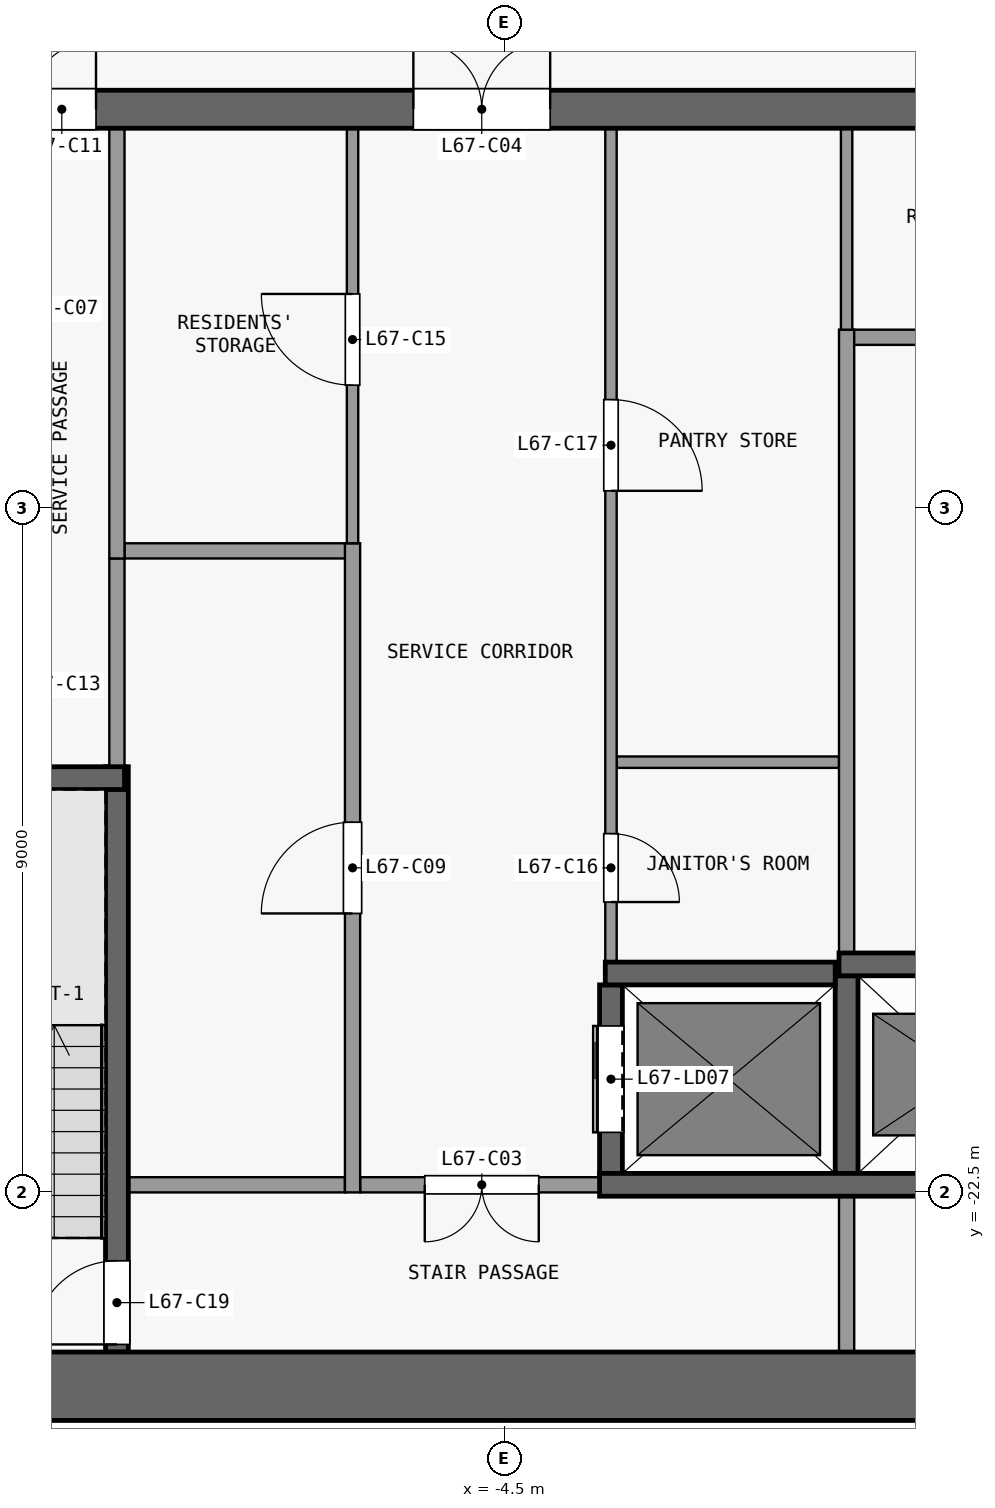
"""IFC4 building model, lengths in metres.
Left out: names, types, materials, properties, quantities, classifications, styles, units other than length and angle.
Written with IfcOpenShell. Run it as: python <this file> out.ifc"""

import sys

from ifc_helpers import new_model, si_unit, direction, frame, frame_2d, origin, place, context, subcontext, project, spatial, rectangle, extrude, element, fill, save


model = new_model("IFC4")
c1 = context("Model", 3, precision=1e-05, world=origin(), true_north=direction((0.0, 1.0)))
c2 = subcontext(c1, "Body", "Model", "MODEL_VIEW")
j1 = project(units=[si_unit("LENGTHUNIT", "METRE"), si_unit("PLANEANGLEUNIT", "RADIAN")], contexts=[c1])
p1 = place(None, origin())
s1 = spatial("IfcSite", under=j1, at=p1, CompositionType="ELEMENT")
p2 = place(p1, origin())
s2 = spatial("IfcBuilding", under=s1, at=p2, CompositionType="ELEMENT")
p3 = place(p2, frame((0.0, 0.0, 266.3)))
s3 = spatial("IfcBuildingStorey", under=s2, at=p3, CompositionType="ELEMENT", Elevation=266.3)
p4 = place(p3, frame((-13.1, -25.05, 0.0), z_axis=(0.0, 0.0, 1.0), x_axis=(1.0, 0.0, 0.0)))
e1 = element("IfcWall", 1, at=p4, inside=s3, PredefinedType="SHEAR", context=c2, shape_type="SweptSolid", body=[
    extrude(rectangle(XDim=26.2, YDim=0.9, at=frame_2d((13.1, 0.0))), origin(), (0.0, 0.0, 1.0), 3.3),
])
p5 = place(p3, frame((-13.1, -8.25, 0.0), z_axis=(0.0, 0.0, 1.0), x_axis=(1.0, 0.0, 0.0)))
e2 = element("IfcWall", 2, at=p5, inside=s3, PredefinedType="SHEAR", context=c2, shape_type="SweptSolid", body=[
    extrude(rectangle(XDim=26.2, YDim=0.5, at=frame_2d((13.1, 0.0))), origin(), (0.0, 0.0, 1.0), 3.3),
])
p6 = place(p5, frame((7.4, 0.0, 0.0)))
e3 = element("IfcOpeningElement", 3, at=p6, cuts=e2, PredefinedType="OPENING", context=c2, shape_type="SweptSolid", body=[
    extrude(rectangle(XDim=1.8, YDim=2.1, at=frame_2d((0.9, 1.05))), frame((0.0, 0.26, 0.0), z_axis=(0.0, -1.0, 0.0), x_axis=(1.0, 0.0, 0.0)), (0.0, 0.0, 1.0), 0.52),
])
p7 = place(p5, frame((17.0, 0.0, 0.0)))
e4 = element("IfcOpeningElement", 4, at=p7, cuts=e2, PredefinedType="OPENING", context=c2, shape_type="SweptSolid", body=[
    extrude(rectangle(XDim=1.8, YDim=2.1, at=frame_2d((0.9, 1.05))), frame((0.0, 0.26, 0.0), z_axis=(0.0, -1.0, 0.0), x_axis=(1.0, 0.0, 0.0)), (0.0, 0.0, 1.0), 0.52),
])
p8 = place(p5, frame((2.325, 0.0, 0.0)))
e5 = element("IfcOpeningElement", 5, at=p8, cuts=e2, PredefinedType="OPENING", context=c2, shape_type="SweptSolid", body=[
    extrude(rectangle(XDim=0.9, YDim=2.1, at=frame_2d((0.45, 1.05))), frame((0.0, 0.26, 0.0), z_axis=(0.0, -1.0, 0.0), x_axis=(1.0, 0.0, 0.0)), (0.0, 0.0, 1.0), 0.52),
])
p9 = place(p5, frame((22.975, 0.0, 0.0)))
e6 = element("IfcOpeningElement", 6, at=p9, cuts=e2, PredefinedType="OPENING", context=c2, shape_type="SweptSolid", body=[
    extrude(rectangle(XDim=0.9, YDim=2.1, at=frame_2d((0.45, 1.05))), frame((0.0, 0.26, 0.0), z_axis=(0.0, -1.0, 0.0), x_axis=(1.0, 0.0, 0.0)), (0.0, 0.0, 1.0), 0.52),
])
p10 = place(p3, frame((-9.45, -22.4, 0.0), z_axis=(0.0, 0.0, 1.0), x_axis=(1.0, 0.0, 0.0)))
e7 = element("IfcWall", 7, at=p10, inside=s3, PredefinedType="PARTITIONING", context=c2, shape_type="SweptSolid", body=[
    extrude(rectangle(XDim=2.85, YDim=0.2, at=frame_2d((1.425, 0.0))), origin(), (0.0, 0.0, 1.0), 3.3),
])
p11 = place(p3, frame((-3.25, -22.4, 0.0), z_axis=(0.0, 0.0, 1.0), x_axis=(-1.0, 0.0, 0.0)))
e8 = element("IfcWall", 8, at=p11, inside=s3, PredefinedType="PARTITIONING", context=c2, shape_type="SweptSolid", body=[
    extrude(rectangle(XDim=3.15, YDim=0.2, at=frame_2d((1.575, 0.0))), origin(), (0.0, 0.0, 1.0), 3.3),
])
p12 = place(p11, frame((0.8, 0.0, 0.0)))
e9 = element("IfcOpeningElement", 9, at=p12, cuts=e8, PredefinedType="OPENING", context=c2, shape_type="SweptSolid", body=[
    extrude(rectangle(XDim=1.5, YDim=2.1, at=frame_2d((0.75, 1.05))), frame((0.0, 0.11, 0.0), z_axis=(0.0, -1.0, 0.0), x_axis=(1.0, 0.0, 0.0)), (0.0, 0.0, 1.0), 0.22),
])
p13 = place(p3, frame((-3.25, -22.4, 0.0), z_axis=(0.0, 0.0, 1.0), x_axis=(1.0, 0.0, 0.0)))
e10 = element("IfcWall", 10, at=p13, inside=s3, PredefinedType="SHEAR", context=c2, shape_type="SweptSolid", body=[
    extrude(rectangle(XDim=6.5, YDim=0.3, at=frame_2d((3.25, 0.0))), origin(), (0.0, 0.0, 1.0), 3.3),
])
p14 = place(p3, frame((-3.175, -19.62, 0.0), z_axis=(0.0, 0.0, 1.0), x_axis=(1.0, 0.0, 0.0)))
e11 = element("IfcWall", 11, at=p14, inside=s3, PredefinedType="SHEAR", context=c2, shape_type="SweptSolid", body=[
    extrude(rectangle(XDim=3.025, YDim=0.3, at=frame_2d((1.513, 0.0))), origin(), (0.0, 0.0, 1.0), 3.3),
])
p15 = place(p3, frame((-0.1, -19.5, 0.0), z_axis=(0.0, 0.0, 1.0), x_axis=(1.0, 0.0, 0.0)))
e12 = element("IfcWall", 12, at=p15, inside=s3, PredefinedType="SHEAR", context=c2, shape_type="SweptSolid", body=[
    extrude(rectangle(XDim=3.3, YDim=0.3, at=frame_2d((1.65, 0.0))), origin(), (0.0, 0.0, 1.0), 3.3),
])
p16 = place(p3, frame((-12.6, -17.05, 0.0), z_axis=(0.0, 0.0, 1.0), x_axis=(1.0, 0.0, 0.0)))
e13 = element("IfcWall", 13, at=p16, inside=s3, PredefinedType="SHEAR", context=c2, shape_type="SweptSolid", body=[
    extrude(rectangle(XDim=3.1, YDim=0.3, at=frame_2d((1.55, 0.0))), origin(), (0.0, 0.0, 1.0), 3.3),
])
p17 = place(p3, frame((-3.025, -16.84, 0.0), z_axis=(0.0, 0.0, 1.0), x_axis=(1.0, 0.0, 0.0)))
e14 = element("IfcWall", 14, at=p17, inside=s3, PredefinedType="PARTITIONING", context=c2, shape_type="SweptSolid", body=[
    extrude(rectangle(XDim=2.925, YDim=0.15, at=frame_2d((1.462, 0.0))), origin(), (0.0, 0.0, 1.0), 3.3),
])
p18 = place(p3, frame((-9.5, -14.06, 0.0), z_axis=(0.0, 0.0, 1.0), x_axis=(1.0, 0.0, 0.0)))
e15 = element("IfcWall", 15, at=p18, inside=s3, PredefinedType="PARTITIONING", context=c2, shape_type="SweptSolid", body=[
    extrude(rectangle(XDim=3.075, YDim=0.2, at=frame_2d((1.538, 0.0))), origin(), (0.0, 0.0, 1.0), 3.3),
])
p19 = place(p3, frame((-0.075, -11.25, 0.0), z_axis=(0.0, 0.0, 1.0), x_axis=(1.0, 0.0, 0.0)))
e16 = element("IfcWall", 16, at=p19, inside=s3, PredefinedType="PARTITIONING", context=c2, shape_type="SweptSolid", body=[
    extrude(rectangle(XDim=3.25, YDim=0.2, at=frame_2d((1.625, 0.0))), origin(), (0.0, 0.0, 1.0), 3.3),
])
p20 = place(p3, frame((-9.6, -24.6, 0.0), z_axis=(0.0, 0.0, 1.0), x_axis=(0.0, 1.0, 0.0)))
e17 = element("IfcWall", 17, at=p20, inside=s3, PredefinedType="SHEAR", context=c2, shape_type="SweptSolid", body=[
    extrude(rectangle(XDim=7.7, YDim=0.3, at=frame_2d((3.85, 0.0))), origin(), (0.0, 0.0, 1.0), 3.3),
])
p21 = place(p20, frame((0.1, 0.0, 0.0)))
e18 = element("IfcOpeningElement", 18, at=p21, cuts=e17, PredefinedType="OPENING", context=c2, shape_type="SweptSolid", body=[
    extrude(rectangle(XDim=1.1, YDim=2.1, at=frame_2d((0.55, 1.05))), frame((0.0, 0.16, 0.0), z_axis=(0.0, -1.0, 0.0), x_axis=(1.0, 0.0, 0.0)), (0.0, 0.0, 1.0), 0.32),
])
p22 = place(p3, frame((-9.6, -16.9, 0.0), z_axis=(0.0, 0.0, 1.0), x_axis=(0.0, 1.0, 0.0)))
e19 = element("IfcWall", 19, at=p22, inside=s3, PredefinedType="PARTITIONING", context=c2, shape_type="SweptSolid", body=[
    extrude(rectangle(XDim=2.74, YDim=0.2, at=frame_2d((1.37, 0.0))), origin(), (0.0, 0.0, 1.0), 3.3),
])
p23 = place(p3, frame((-9.6, -14.16, 0.0), z_axis=(0.0, 0.0, 1.0), x_axis=(0.0, 1.0, 0.0)))
e20 = element("IfcWall", 20, at=p23, inside=s3, PredefinedType="PARTITIONING", context=c2, shape_type="SweptSolid", body=[
    extrude(rectangle(XDim=5.66, YDim=0.2, at=frame_2d((2.83, 0.0))), origin(), (0.0, 0.0, 1.0), 3.3),
])
p24 = place(p3, frame((-6.5, -22.5, 0.0), z_axis=(0.0, 0.0, 1.0), x_axis=(0.0, 1.0, 0.0)))
e21 = element("IfcWall", 21, at=p24, inside=s3, PredefinedType="PARTITIONING", context=c2, shape_type="SweptSolid", body=[
    extrude(rectangle(XDim=8.54, YDim=0.2, at=frame_2d((4.27, 0.0))), origin(), (0.0, 0.0, 1.0), 3.3),
])
p25 = place(p24, frame((3.67, 0.0, 0.0)))
e22 = element("IfcOpeningElement", 22, at=p25, cuts=e21, PredefinedType="OPENING", context=c2, shape_type="SweptSolid", body=[
    extrude(rectangle(XDim=1.2, YDim=2.1, at=frame_2d((0.6, 1.05))), frame((0.0, 0.11, 0.0), z_axis=(0.0, -1.0, 0.0), x_axis=(1.0, 0.0, 0.0)), (0.0, 0.0, 1.0), 0.22),
])
p26 = place(p3, frame((-6.5, -13.96, 0.0), z_axis=(0.0, 0.0, 1.0), x_axis=(0.0, 1.0, 0.0)))
e23 = element("IfcWall", 23, at=p26, inside=s3, PredefinedType="PARTITIONING", context=c2, shape_type="SweptSolid", body=[
    extrude(rectangle(XDim=5.46, YDim=0.15, at=frame_2d((2.73, 0.0))), origin(), (0.0, 0.0, 1.0), 3.3),
])
p27 = place(p26, frame((2.08, 0.0, 0.0)))
e24 = element("IfcOpeningElement", 24, at=p27, cuts=e23, PredefinedType="OPENING", context=c2, shape_type="SweptSolid", body=[
    extrude(rectangle(XDim=1.2, YDim=2.1, at=frame_2d((0.6, 1.05))), frame((0.0, 0.085, 0.0), z_axis=(0.0, -1.0, 0.0), x_axis=(1.0, 0.0, 0.0)), (0.0, 0.0, 1.0), 0.17),
])
p28 = place(p3, frame((-3.1, -22.25, 0.0), z_axis=(0.0, 0.0, 1.0), x_axis=(0.0, 1.0, 0.0)))
e25 = element("IfcWall", 25, at=p28, inside=s3, PredefinedType="SHEAR", context=c2, shape_type="SweptSolid", body=[
    extrude(rectangle(XDim=2.48, YDim=0.3, at=frame_2d((1.24, 0.0))), origin(), (0.0, 0.0, 1.0), 3.3),
])
p29 = place(p28, frame((0.54, 0.0, 0.0)))
e26 = element("IfcOpeningElement", 26, at=p29, cuts=e25, PredefinedType="OPENING", context=c2, shape_type="SweptSolid", body=[
    extrude(rectangle(XDim=1.4, YDim=2.1, at=frame_2d((0.7, 1.05))), frame((0.0, 0.16, 0.0), z_axis=(0.0, -1.0, 0.0), x_axis=(1.0, 0.0, 0.0)), (0.0, 0.0, 1.0), 0.32),
])
p30 = place(p3, frame((-3.1, -8.5, 0.0), z_axis=(0.0, 0.0, 1.0), x_axis=(0.0, -1.0, 0.0)))
e27 = element("IfcWall", 27, at=p30, inside=s3, PredefinedType="PARTITIONING", context=c2, shape_type="SweptSolid", body=[
    extrude(rectangle(XDim=10.97, YDim=0.15, at=frame_2d((5.485, 0.0))), origin(), (0.0, 0.0, 1.0), 3.3),
])
p31 = place(p30, frame((9.28, 0.0, 0.0)))
e28 = element("IfcOpeningElement", 28, at=p31, cuts=e27, PredefinedType="OPENING", context=c2, shape_type="SweptSolid", body=[
    extrude(rectangle(XDim=0.9, YDim=2.1, at=frame_2d((0.45, 1.05))), frame((0.0, 0.085, 0.0), z_axis=(0.0, -1.0, 0.0), x_axis=(1.0, 0.0, 0.0)), (0.0, 0.0, 1.0), 0.17),
])
p32 = place(p30, frame((3.57, 0.0, 0.0)))
e29 = element("IfcOpeningElement", 29, at=p32, cuts=e27, PredefinedType="OPENING", context=c2, shape_type="SweptSolid", body=[
    extrude(rectangle(XDim=1.2, YDim=2.1, at=frame_2d((0.6, 1.05))), frame((0.0, 0.085, 0.0), z_axis=(0.0, -1.0, 0.0), x_axis=(1.0, 0.0, 0.0)), (0.0, 0.0, 1.0), 0.17),
])
p33 = place(p3, frame((0.0, -24.6, 0.0), z_axis=(0.0, 0.0, 1.0), x_axis=(0.0, 1.0, 0.0)))
e30 = element("IfcWall", 30, at=p33, inside=s3, PredefinedType="PARTITIONING", context=c2, shape_type="SweptSolid", body=[
    extrude(rectangle(XDim=2.05, YDim=0.2, at=frame_2d((1.025, 0.0))), origin(), (0.0, 0.0, 1.0), 3.3),
])
p34 = place(p3, frame((0.0, -22.25, 0.0), z_axis=(0.0, 0.0, 1.0), x_axis=(0.0, 1.0, 0.0)))
e31 = element("IfcWall", 31, at=p34, inside=s3, PredefinedType="SHEAR", context=c2, shape_type="SweptSolid", body=[
    extrude(rectangle(XDim=2.6, YDim=0.3, at=frame_2d((1.3, 0.0))), origin(), (0.0, 0.0, 1.0), 3.3),
])
p35 = place(p3, frame((0.0, -19.35, 0.0), z_axis=(0.0, 0.0, 1.0), x_axis=(0.0, 1.0, 0.0)))
e32 = element("IfcWall", 32, at=p35, inside=s3, PredefinedType="PARTITIONING", context=c2, shape_type="SweptSolid", body=[
    extrude(rectangle(XDim=8.2, YDim=0.2, at=frame_2d((4.1, 0.0))), origin(), (0.0, 0.0, 1.0), 3.3),
])
p36 = place(p3, frame((0.0, -11.15, 0.0), z_axis=(0.0, 0.0, 1.0), x_axis=(0.0, 1.0, 0.0)))
e33 = element("IfcWall", 33, at=p36, inside=s3, PredefinedType="PARTITIONING", context=c2, shape_type="SweptSolid", body=[
    extrude(rectangle(XDim=2.65, YDim=0.15, at=frame_2d((1.325, 0.0))), origin(), (0.0, 0.0, 1.0), 3.3),
])
p37 = place(p29, origin())
e34 = element("IfcDoor", 34, at=p37, inside=s3, OperationType="DOUBLE_DOOR_SLIDING", PredefinedType="DOOR", context=c2, shape_type="SweptSolid", body=[
    extrude(rectangle(XDim=1.4, YDim=2.1, at=frame_2d((0.7, 1.05))), frame((0.0, 0.025, 0.0), z_axis=(0.0, -1.0, 0.0), x_axis=(1.0, 0.0, 0.0)), (0.0, 0.0, 1.0), 0.05),
])
fill(e26, e34)
p38 = place(p12, origin())
e35 = element("IfcDoor", 35, at=p38, inside=s3, OperationType="DOUBLE_DOOR_SINGLE_SWING", PredefinedType="DOOR", context=c2, shape_type="SweptSolid", body=[
    extrude(rectangle(XDim=1.5, YDim=2.1, at=frame_2d((0.75, 1.05))), frame((0.0, 0.025, 0.0), z_axis=(0.0, -1.0, 0.0), x_axis=(1.0, 0.0, 0.0)), (0.0, 0.0, 1.0), 0.05),
])
fill(e9, e35)
p39 = place(p6, origin())
e36 = element("IfcDoor", 36, at=p39, inside=s3, OperationType="DOUBLE_DOOR_SINGLE_SWING", PredefinedType="DOOR", context=c2, shape_type="SweptSolid", body=[
    extrude(rectangle(XDim=1.8, YDim=2.1, at=frame_2d((0.9, 1.05))), frame((0.0, 0.025, 0.0), z_axis=(0.0, -1.0, 0.0), x_axis=(1.0, 0.0, 0.0)), (0.0, 0.0, 1.0), 0.05),
])
fill(e3, e36)
p40 = place(p25, origin())
e37 = element("IfcDoor", 37, at=p40, inside=s3, OperationType="SINGLE_SWING_LEFT", PredefinedType="DOOR", context=c2, shape_type="SweptSolid", body=[
    extrude(rectangle(XDim=1.2, YDim=2.1, at=frame_2d((0.6, 1.05))), frame((0.0, 0.025, 0.0), z_axis=(0.0, -1.0, 0.0), x_axis=(1.0, 0.0, 0.0)), (0.0, 0.0, 1.0), 0.05),
])
fill(e22, e37)
p41 = place(p8, origin())
e38 = element("IfcDoor", 38, at=p41, inside=s3, OperationType="SINGLE_SWING_RIGHT", PredefinedType="DOOR", context=c2, shape_type="SweptSolid", body=[
    extrude(rectangle(XDim=0.9, YDim=2.1, at=frame_2d((0.45, 1.05))), frame((0.0, 0.025, 0.0), z_axis=(0.0, -1.0, 0.0), x_axis=(1.0, 0.0, 0.0)), (0.0, 0.0, 1.0), 0.05),
])
fill(e5, e38)
p42 = place(p27, origin())
e39 = element("IfcDoor", 39, at=p42, inside=s3, OperationType="SINGLE_SWING_RIGHT", PredefinedType="DOOR", context=c2, shape_type="SweptSolid", body=[
    extrude(rectangle(XDim=1.2, YDim=2.1, at=frame_2d((0.6, 1.05))), frame((0.0, 0.025, 0.0), z_axis=(0.0, -1.0, 0.0), x_axis=(1.0, 0.0, 0.0)), (0.0, 0.0, 1.0), 0.05),
])
fill(e24, e39)
p43 = place(p31, origin())
e40 = element("IfcDoor", 40, at=p43, inside=s3, OperationType="SINGLE_SWING_RIGHT", PredefinedType="DOOR", context=c2, shape_type="SweptSolid", body=[
    extrude(rectangle(XDim=0.9, YDim=2.1, at=frame_2d((0.45, 1.05))), frame((0.0, 0.025, 0.0), z_axis=(0.0, -1.0, 0.0), x_axis=(1.0, 0.0, 0.0)), (0.0, 0.0, 1.0), 0.05),
])
fill(e28, e40)
p44 = place(p32, origin())
e41 = element("IfcDoor", 41, at=p44, inside=s3, OperationType="SINGLE_SWING_RIGHT", PredefinedType="DOOR", context=c2, shape_type="SweptSolid", body=[
    extrude(rectangle(XDim=1.2, YDim=2.1, at=frame_2d((0.6, 1.05))), frame((0.0, 0.025, 0.0), z_axis=(0.0, -1.0, 0.0), x_axis=(1.0, 0.0, 0.0)), (0.0, 0.0, 1.0), 0.05),
])
fill(e29, e41)
p45 = place(p21, origin())
e42 = element("IfcDoor", 42, at=p45, inside=s3, OperationType="SINGLE_SWING_LEFT", PredefinedType="DOOR", context=c2, shape_type="SweptSolid", body=[
    extrude(rectangle(XDim=1.1, YDim=2.1, at=frame_2d((0.55, 1.05))), frame((0.0, 0.025, 0.0), z_axis=(0.0, -1.0, 0.0), x_axis=(1.0, 0.0, 0.0)), (0.0, 0.0, 1.0), 0.05),
])
fill(e18, e42)
save(model, sys.argv[1])
